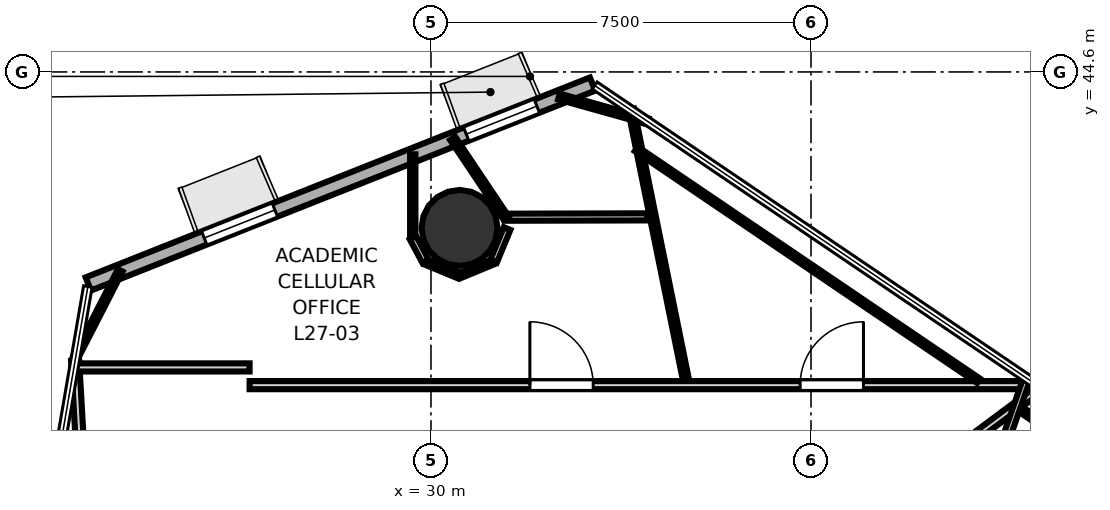
"""IFC4 building model, lengths in metres.
Left out: names, types, materials, properties, quantities, classifications, styles, units other than length and angle.
Written with IfcOpenShell. Run it as: python <this file> out.ifc"""

import sys

from ifc_helpers import new_model, si_unit, direction, frame, frame_2d, origin, origin_2d, place, context, subcontext, project, spatial, rectangle, hollow_circle, extrude, element, fill, save


model = new_model("IFC4")
c1 = context("Model", 3, precision=1e-05, world=origin(), true_north=direction((0.0, 1.0)))
c2 = subcontext(c1, "Body", "Model", "MODEL_VIEW")
j1 = project(units=[si_unit("LENGTHUNIT", "METRE"), si_unit("PLANEANGLEUNIT", "RADIAN")], contexts=[c1])
p1 = place(None, origin())
s1 = spatial("IfcSite", under=j1, at=p1, CompositionType="ELEMENT")
p2 = place(p1, origin())
s2 = spatial("IfcBuilding", under=s1, at=p2, CompositionType="ELEMENT")
p3 = place(p2, frame((0.0, 0.0, 108.9)))
s3 = spatial("IfcBuildingStorey", under=s2, at=p3, CompositionType="ELEMENT", Elevation=108.9)
p4 = place(p3, frame((30.564, 41.521, 0.0), z_axis=(0.0, 0.0, 1.0), x_axis=(1.0, 0.0, 0.0)))
e1 = element("IfcColumn", 1, at=p4, inside=s3, PredefinedType="COLUMN", context=c2, shape_type="SweptSolid", body=[
    extrude(hollow_circle(Radius=0.75, WallThickness=0.036, at=origin_2d()), origin(), (0.0, 0.0, 1.0), 3.7),
])
p5 = place(p3, frame((33.188, 44.361, 0.0), z_axis=(0.0, 0.0, 1.0), x_axis=(-0.929607947385, -0.368549947983, 0.0)))
e2 = element("IfcWall", 2, at=p5, inside=s3, PredefinedType="SOLIDWALL", context=c2, shape_type="SweptSolid", body=[
    extrude(rectangle(XDim=10.705, YDim=0.28, at=frame_2d((5.353, 0.0))), origin(), (0.0, 0.0, 1.0), 3.52),
])
p6 = place(p5, frame((1.181, 0.0, 0.85)))
e3 = element("IfcOpeningElement", 3, at=p6, cuts=e2, PredefinedType="OPENING", context=c2, shape_type="SweptSolid", body=[
    extrude(rectangle(XDim=1.5, YDim=2.1, at=frame_2d((0.75, 1.05))), frame((0.0, 0.15, 0.0), z_axis=(0.0, -1.0, 0.0), x_axis=(1.0, 0.0, 0.0)), (0.0, 0.0, 1.0), 0.3),
])
p7 = place(p5, frame((6.743, 0.0, 0.85)))
e4 = element("IfcOpeningElement", 4, at=p7, cuts=e2, PredefinedType="OPENING", context=c2, shape_type="SweptSolid", body=[
    extrude(rectangle(XDim=1.5, YDim=2.1, at=frame_2d((0.75, 1.05))), frame((0.0, 0.15, 0.0), z_axis=(0.0, -1.0, 0.0), x_axis=(1.0, 0.0, 0.0)), (0.0, 0.0, 1.0), 0.3),
])
p8 = place(p3, frame((23.581, 28.307, 0.0), z_axis=(0.0, 0.0, 1.0), x_axis=(-0.056927299401, 0.998378326379, 0.0)))
e5 = element("IfcWall", 5, at=p8, inside=s3, PredefinedType="PARTITIONING", context=c2, shape_type="SweptSolid", body=[
    extrude(rectangle(XDim=10.615, YDim=0.16, at=frame_2d((5.307, 0.0))), origin(), (0.0, 0.0, 1.0), 2.84),
])
p9 = place(p8, frame((3.594, 0.0, 0.0)))
e6 = element("IfcOpeningElement", 6, at=p9, cuts=e5, PredefinedType="OPENING", context=c2, shape_type="SweptSolid", body=[
    extrude(rectangle(XDim=1.25, YDim=2.2, at=frame_2d((0.625, 1.1))), frame((0.0, 0.09, 0.0), z_axis=(0.0, -1.0, 0.0), x_axis=(1.0, 0.0, 0.0)), (0.0, 0.0, 1.0), 0.18),
])
p10 = place(p3, frame((22.934, 38.769, 0.0), z_axis=(0.0, 0.0, 1.0), x_axis=(1.0, 0.0, 0.0)))
e7 = element("IfcWall", 7, at=p10, inside=s3, PredefinedType="PARTITIONING", context=c2, shape_type="SweptSolid", body=[
    extrude(rectangle(XDim=3.486, YDim=0.16, at=frame_2d((1.743, 0.0))), origin(), (0.0, 0.0, 1.0), 2.84),
])
p11 = place(p3, frame((26.42, 38.419, 0.0), z_axis=(0.0, 0.0, 1.0), x_axis=(1.0, 0.0, 0.0)))
e8 = element("IfcWall", 8, at=p11, inside=s3, PredefinedType="PARTITIONING", context=c2, shape_type="SweptSolid", body=[
    extrude(rectangle(XDim=15.56, YDim=0.16, at=frame_2d((7.78, 0.0))), origin(), (0.0, 0.0, 1.0), 2.84),
])
p12 = place(p11, frame((10.865, 0.0, 0.0)))
e9 = element("IfcOpeningElement", 9, at=p12, cuts=e8, PredefinedType="OPENING", context=c2, shape_type="SweptSolid", body=[
    extrude(rectangle(XDim=1.25, YDim=2.2, at=frame_2d((0.625, 1.1))), frame((0.0, 0.09, 0.0), z_axis=(0.0, -1.0, 0.0), x_axis=(1.0, 0.0, 0.0)), (0.0, 0.0, 1.0), 0.18),
])
p13 = place(p11, frame((5.532, 0.0, 0.0)))
e10 = element("IfcOpeningElement", 10, at=p13, cuts=e8, PredefinedType="OPENING", context=c2, shape_type="SweptSolid", body=[
    extrude(rectangle(XDim=1.25, YDim=2.2, at=frame_2d((0.625, 1.1))), frame((0.0, 0.09, 0.0), z_axis=(0.0, -1.0, 0.0), x_axis=(1.0, 0.0, 0.0)), (0.0, 0.0, 1.0), 0.18),
])
p14 = place(p3, frame((42.053, 38.379, 0.0), z_axis=(0.0, 0.0, 1.0), x_axis=(-0.802246834953, -0.596992475504, 0.0)))
e11 = element("IfcWall", 11, at=p14, inside=s3, PredefinedType="PARTITIONING", context=c2, shape_type="SweptSolid", body=[
    extrude(rectangle(XDim=2.796, YDim=0.16, at=frame_2d((1.398, 0.0))), origin(), (0.0, 0.0, 1.0), 2.84),
])
p15 = place(p3, frame((41.122, 36.72, 0.0), z_axis=(0.0, 0.0, 1.0), x_axis=(0.329225111587, 0.944251463277, 0.0)))
e12 = element("IfcWall", 12, at=p15, inside=s3, PredefinedType="PARTITIONING", context=c2, shape_type="SweptSolid", body=[
    extrude(rectangle(XDim=1.962, YDim=0.14, at=frame_2d((0.981, 0.0))), origin(), (0.0, 0.0, 1.0), 2.84),
])
p16 = place(p3, frame((41.65, 37.933, 0.0), z_axis=(0.0, 0.0, 1.0), x_axis=(0.827941747022, -0.560814107827, 0.0)))
e13 = element("IfcWall", 13, at=p16, inside=s3, PredefinedType="PARTITIONING", context=c2, shape_type="SweptSolid", body=[
    extrude(rectangle(XDim=11.895, YDim=0.12, at=frame_2d((5.948, 0.0))), origin(), (0.0, 0.0, 1.0), 2.84),
])
p17 = place(p3, frame((35.029, 38.536, 0.0), z_axis=(0.0, 0.0, 1.0), x_axis=(-0.198965568746, 0.980006480822, 0.0)))
e14 = element("IfcWall", 14, at=p17, inside=s3, PredefinedType="PARTITIONING", context=c2, shape_type="SweptSolid", body=[
    extrude(rectangle(XDim=5.436, YDim=0.12, at=frame_2d((2.718, 0.0))), origin(), (0.0, 0.0, 1.0), 2.84),
])
p18 = place(p3, frame((34.052, 43.08, 0.0), z_axis=(0.0, 0.0, 1.0), x_axis=(0.827934826591, -0.560824324471, 0.0)))
e15 = element("IfcWall", 15, at=p18, inside=s3, PredefinedType="PARTITIONING", context=c2, shape_type="SweptSolid", body=[
    extrude(rectangle(XDim=8.158, YDim=0.105, at=frame_2d((4.079, 0.0))), origin(), (0.0, 0.0, 1.0), 2.84),
])
p19 = place(p3, frame((22.988, 38.968, 0.0), z_axis=(0.0, 0.0, 1.0), x_axis=(0.456105833623, 0.889925541006, 0.0)))
e16 = element("IfcWall", 16, at=p19, inside=s3, PredefinedType="PARTITIONING", context=c2, shape_type="SweptSolid", body=[
    extrude(rectangle(XDim=1.928, YDim=0.105, at=frame_2d((0.964, 0.0))), origin(), (0.0, 0.0, 1.0), 2.84),
])
p20 = place(p3, frame((32.524, 44.115, 0.0), z_axis=(0.0, 0.0, 1.0), x_axis=(0.962878976212, -0.269933468042, 0.0)))
e17 = element("IfcWall", 17, at=p20, inside=s3, PredefinedType="PARTITIONING", context=c2, shape_type="SweptSolid", body=[
    extrude(rectangle(XDim=1.82, YDim=0.12, at=frame_2d((0.91, 0.0))), origin(), (0.0, 0.0, 1.0), 2.84),
])
p21 = place(p3, frame((34.267, 41.74, 0.0), z_axis=(0.0, 0.0, 1.0), x_axis=(-0.999996830361, -0.002517790248, 0.0)))
e18 = element("IfcWall", 18, at=p21, inside=s3, PredefinedType="PARTITIONING", context=c2, shape_type="SweptSolid", body=[
    extrude(rectangle(XDim=2.812, YDim=0.14, at=frame_2d((1.406, 0.0))), origin(), (0.0, 0.0, 1.0), 2.84),
])
p22 = place(p3, frame((31.481, 41.719, 0.0), z_axis=(0.0, 0.0, 1.0), x_axis=(-0.556846029643, 0.830615735025, 0.0)))
e19 = element("IfcWall", 19, at=p22, inside=s3, PredefinedType="PARTITIONING", context=c2, shape_type="SweptSolid", body=[
    extrude(rectangle(XDim=1.889, YDim=0.12, at=frame_2d((0.944, 0.0))), origin(), (0.0, 0.0, 1.0), 2.84),
])
p23 = place(p3, frame((29.64, 42.974, 0.0), z_axis=(0.0, 0.0, 1.0), x_axis=(0.0, -1.0, 0.0)))
e20 = element("IfcWall", 20, at=p23, inside=s3, PredefinedType="PARTITIONING", context=c2, shape_type="SweptSolid", body=[
    extrude(rectangle(XDim=1.631, YDim=0.105, at=frame_2d((0.815, 0.0))), origin(), (0.0, 0.0, 1.0), 2.84),
])
p24 = place(p3, frame((29.644, 41.329, 0.0), z_axis=(0.0, 0.0, 1.0), x_axis=(0.471618839574, -0.881802511994, 0.0)))
e21 = element("IfcWall", 21, at=p24, inside=s3, PredefinedType="PARTITIONING", context=c2, shape_type="SweptSolid", body=[
    extrude(rectangle(XDim=0.529, YDim=0.14, at=frame_2d((0.264, 0.0))), origin(), (0.0, 0.0, 1.0), 2.84),
])
p25 = place(p3, frame((29.909, 40.849, 0.0), z_axis=(0.0, 0.0, 1.0), x_axis=(0.923935648299, -0.382547928764, 0.0)))
e22 = element("IfcWall", 22, at=p25, inside=s3, PredefinedType="PARTITIONING", context=c2, shape_type="SweptSolid", body=[
    extrude(rectangle(XDim=0.696, YDim=0.12, at=frame_2d((0.348, 0.0))), origin(), (0.0, 0.0, 1.0), 2.84),
])
p26 = place(p3, frame((30.576, 40.583, 0.0), z_axis=(0.0, 0.0, 1.0), x_axis=(0.923935648299, 0.382547928764, 0.0)))
e23 = element("IfcWall", 23, at=p26, inside=s3, PredefinedType="PARTITIONING", context=c2, shape_type="SweptSolid", body=[
    extrude(rectangle(XDim=0.696, YDim=0.105, at=frame_2d((0.348, 0.0))), origin(), (0.0, 0.0, 1.0), 2.84),
])
p27 = place(p3, frame((31.236, 40.866, 0.0), z_axis=(0.0, 0.0, 1.0), x_axis=(0.381929177829, 0.92419159438, 0.0)))
e24 = element("IfcWall", 24, at=p27, inside=s3, PredefinedType="PARTITIONING", context=c2, shape_type="SweptSolid", body=[
    extrude(rectangle(XDim=0.698, YDim=0.14, at=frame_2d((0.349, 0.0))), origin(), (0.0, 0.0, 1.0), 2.84),
])
p28 = place(p12, origin())
e25 = element("IfcDoor", 25, at=p28, inside=s3, OperationType="SINGLE_SWING_RIGHT", PredefinedType="DOOR", context=c2, shape_type="SweptSolid", body=[
    extrude(rectangle(XDim=1.25, YDim=2.2, at=frame_2d((0.625, 1.1))), frame((0.0, 0.025, 0.0), z_axis=(0.0, -1.0, 0.0), x_axis=(1.0, 0.0, 0.0)), (0.0, 0.0, 1.0), 0.05),
])
fill(e9, e25)
p29 = place(p13, origin())
e26 = element("IfcDoor", 26, at=p29, inside=s3, OperationType="SINGLE_SWING_LEFT", PredefinedType="DOOR", context=c2, shape_type="SweptSolid", body=[
    extrude(rectangle(XDim=1.25, YDim=2.2, at=frame_2d((0.625, 1.1))), frame((0.0, 0.025, 0.0), z_axis=(0.0, -1.0, 0.0), x_axis=(1.0, 0.0, 0.0)), (0.0, 0.0, 1.0), 0.05),
])
fill(e10, e26)
p30 = place(p6, origin())
e27 = element("IfcWindow", 27, at=p30, inside=s3, PartitioningType="SINGLE_PANEL", PredefinedType="WINDOW", context=c2, shape_type="SweptSolid", body=[
    extrude(rectangle(XDim=1.5, YDim=2.1, at=frame_2d((0.75, 1.05))), frame((0.0, 0.03, 0.0), z_axis=(0.0, -1.0, 0.0), x_axis=(1.0, 0.0, 0.0)), (0.0, 0.0, 1.0), 0.06),
])
fill(e3, e27)
p31 = place(p7, origin())
e28 = element("IfcWindow", 28, at=p31, inside=s3, PartitioningType="SINGLE_PANEL", PredefinedType="WINDOW", context=c2, shape_type="SweptSolid", body=[
    extrude(rectangle(XDim=1.5, YDim=2.1, at=frame_2d((0.75, 1.05))), frame((0.0, 0.03, 0.0), z_axis=(0.0, -1.0, 0.0), x_axis=(1.0, 0.0, 0.0)), (0.0, 0.0, 1.0), 0.06),
])
fill(e4, e28)
save(model, sys.argv[1])
